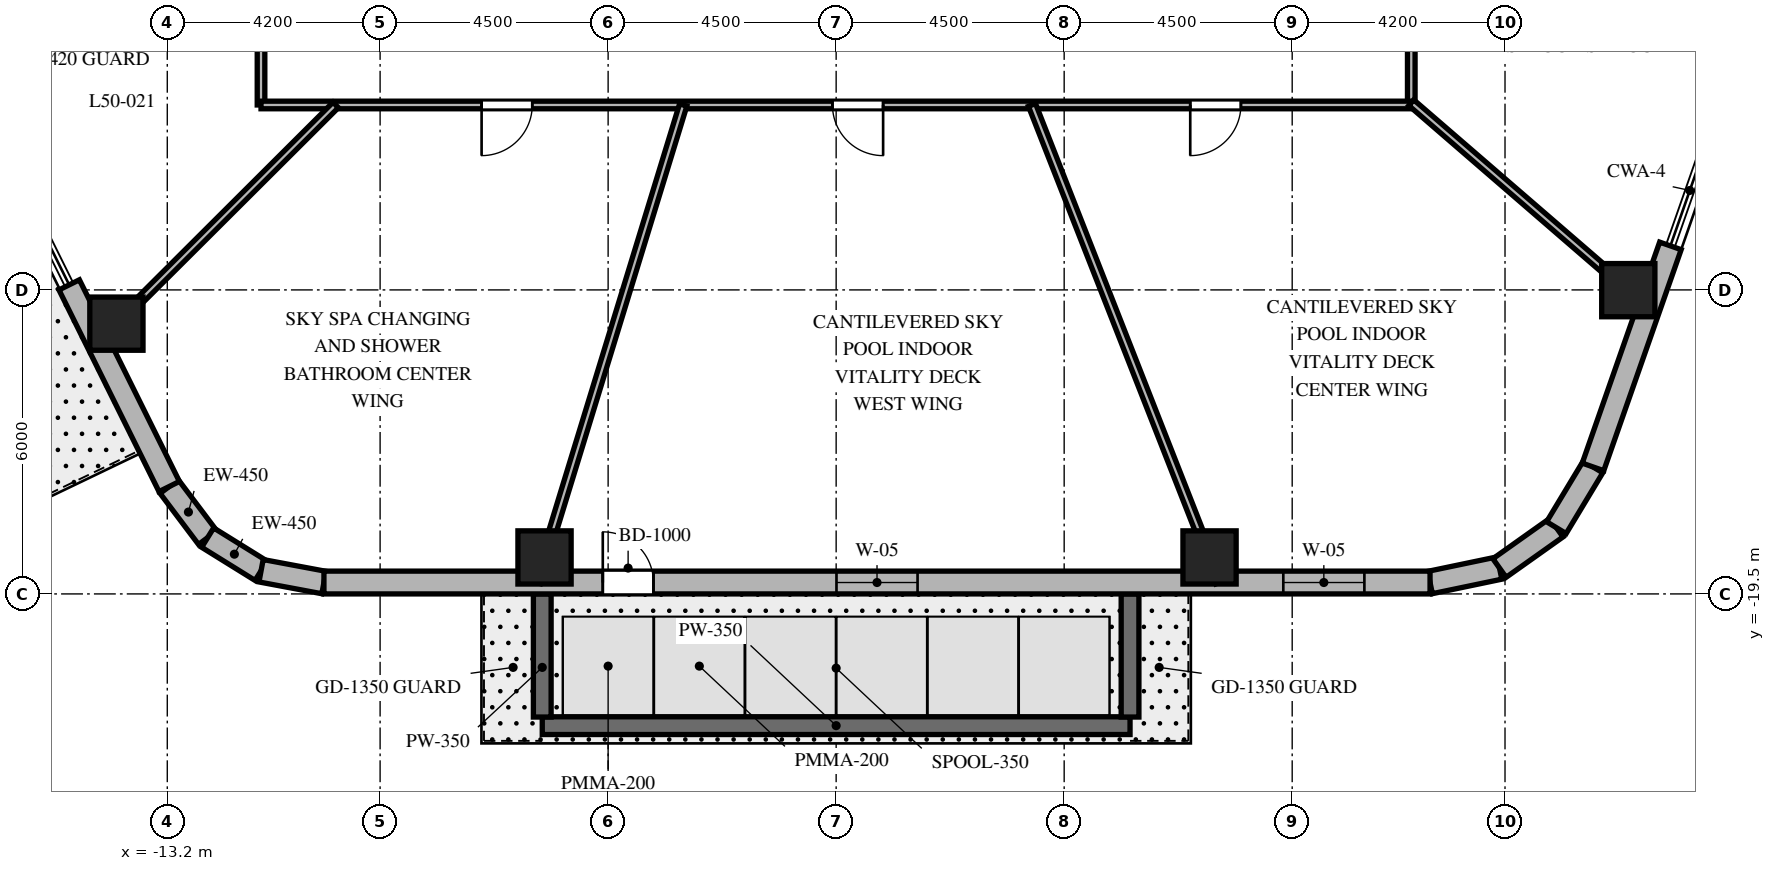
"""IFC4 building model, lengths in metres.
Left out: names, types, materials, properties, quantities, classifications, styles, units other than length and angle.
Written with IfcOpenShell. Run it as: python <this file> out.ifc"""

import sys

from ifc_helpers import new_model, si_unit, direction, frame, frame_2d, origin, origin_2d, place, context, subcontext, project, spatial, rectangle, extrude, element, fill, save


model = new_model("IFC4")
c1 = context("Model", 3, precision=1e-05, world=origin(), true_north=direction((0.0, 1.0)))
c2 = subcontext(c1, "Body", "Model", "MODEL_VIEW")
j1 = project(units=[si_unit("LENGTHUNIT", "METRE"), si_unit("PLANEANGLEUNIT", "RADIAN")], contexts=[c1])
p1 = place(None, origin())
s1 = spatial("IfcSite", under=j1, at=p1, CompositionType="ELEMENT")
p2 = place(p1, origin())
s2 = spatial("IfcBuilding", under=s1, at=p2, CompositionType="ELEMENT")
p3 = place(p2, frame((0.0, 0.0, 201.5)))
s3 = spatial("IfcBuildingStorey", under=s2, at=p3, CompositionType="ELEMENT", Elevation=201.5)
for number, where, z_axis, x_axis in (
    (1, (-5.755, -18.78, 0.0), (0.0, 0.0, 1.0), (1.0, 0.0, 0.0)),
    (2, (7.369, -18.78, 0.0), (0.0, 0.0, 1.0), (1.0, 0.0, 0.0)),
    (3, (15.633, -13.505, 0.0), (0.0, 0.0, 1.0), (1.0, 0.0, 0.0)),
    (4, (-14.204, -14.166, 0.0), (0.0, 0.0, 1.0), (1.0, 0.0, 0.0)),
):
    element("IfcColumn", number, at=place(p3, frame(where, z_axis=z_axis, x_axis=x_axis)), inside=s3, PredefinedType="COLUMN", context=c2, shape_type="SweptSolid", body=[
        extrude(rectangle(XDim=1.05, YDim=1.05, at=origin_2d()), origin(), (0.0, 0.0, 1.0), 5.0),
    ])
p4 = place(p3, frame((-5.8, -22.1, 0.0), z_axis=(0.0, 0.0, 1.0), x_axis=(1.0, 0.0, 0.0)))
e5 = element("IfcWall", 5, at=p4, inside=s3, PredefinedType="SOLIDWALL", context=c2, shape_type="SweptSolid", body=[
    extrude(rectangle(XDim=11.6, YDim=0.35, at=frame_2d((5.8, 0.0))), origin(), (0.0, 0.0, 1.0), 1.42),
])
for number, where, z_axis, x_axis in (
    (6, (-5.8, -21.93, 0.0), (0.0, 0.0, 1.0), (0.0, 1.0, 0.0)),
    (7, (5.8, -21.93, 0.0), (0.0, 0.0, 1.0), (0.0, 1.0, 0.0)),
):
    element("IfcWall", number, at=place(p3, frame(where, z_axis=z_axis, x_axis=x_axis)), inside=s3, PredefinedType="SOLIDWALL", context=c2, shape_type="SweptSolid", body=[
        extrude(rectangle(XDim=2.43, YDim=0.35, at=frame_2d((1.215, 0.0))), origin(), (0.0, 0.0, 1.0), 1.42),
    ])
p5 = place(p3, frame((-13.162, -17.381, 0.0), z_axis=(0.0, 0.0, 1.0), x_axis=(0.601515770517, -0.798860925205, 0.0)))
e8 = element("IfcWall", 8, at=p5, inside=s3, PredefinedType="SOLIDWALL", context=c2, shape_type="SweptSolid", body=[
    extrude(rectangle(XDim=1.262, YDim=0.45, at=frame_2d((0.631, 0.0))), origin(), (0.0, 0.0, 1.0), 4.7),
])
p6 = place(p3, frame((-12.403, -18.389, 0.0), z_axis=(0.0, 0.0, 1.0), x_axis=(0.849795170926, -0.527113049991, 0.0)))
e9 = element("IfcWall", 9, at=p6, inside=s3, PredefinedType="SOLIDWALL", context=c2, shape_type="SweptSolid", body=[
    extrude(rectangle(XDim=1.241, YDim=0.45, at=frame_2d((0.62, 0.0))), origin(), (0.0, 0.0, 1.0), 4.7),
])
p7 = place(p3, frame((-11.349, -19.043, 0.0), z_axis=(0.0, 0.0, 1.0), x_axis=(0.982931267051, -0.183973161772, 0.0)))
e10 = element("IfcWall", 10, at=p7, inside=s3, PredefinedType="SOLIDWALL", context=c2, shape_type="SweptSolid", body=[
    extrude(rectangle(XDim=1.262, YDim=0.45, at=frame_2d((0.631, 0.0))), origin(), (0.0, 0.0, 1.0), 4.7),
])
p8 = place(p3, frame((11.72, -19.275, 0.0), z_axis=(0.0, 0.0, 1.0), x_axis=(0.97893106758, 0.204191001093, 0.0)))
e11 = element("IfcWall", 11, at=p8, inside=s3, PredefinedType="SOLIDWALL", context=c2, shape_type="SweptSolid", body=[
    extrude(rectangle(XDim=1.4, YDim=0.45, at=frame_2d((0.7, 0.0))), origin(), (0.0, 0.0, 1.0), 4.7),
])
p9 = place(p3, frame((13.091, -18.989, 0.0), z_axis=(0.0, 0.0, 1.0), x_axis=(0.815574637848, 0.578651890258, 0.0)))
e12 = element("IfcWall", 12, at=p9, inside=s3, PredefinedType="SOLIDWALL", context=c2, shape_type="SweptSolid", body=[
    extrude(rectangle(XDim=1.377, YDim=0.45, at=frame_2d((0.688, 0.0))), origin(), (0.0, 0.0, 1.0), 4.7),
])
p10 = place(p3, frame((14.214, -18.192, 0.0), z_axis=(0.0, 0.0, 1.0), x_axis=(0.516340945502, 0.856383108193, 0.0)))
e13 = element("IfcWall", 13, at=p10, inside=s3, PredefinedType="SOLIDWALL", context=c2, shape_type="SweptSolid", body=[
    extrude(rectangle(XDim=1.4, YDim=0.45, at=frame_2d((0.7, 0.0))), origin(), (0.0, 0.0, 1.0), 4.7),
])
p11 = place(p3, frame((-10.108, -19.275, 0.0), z_axis=(0.0, 0.0, 1.0), x_axis=(1.0, 0.0, 0.0)))
e14 = element("IfcWall", 14, at=p11, inside=s3, PredefinedType="SOLIDWALL", context=c2, shape_type="SweptSolid", body=[
    extrude(rectangle(XDim=21.829, YDim=0.45, at=frame_2d((10.915, 0.0))), origin(), (0.0, 0.0, 1.0), 4.7),
])
p12 = place(p11, frame((5.503, 0.0, 0.0)))
e15 = element("IfcOpeningElement", 15, at=p12, cuts=e14, PredefinedType="OPENING", context=c2, shape_type="SweptSolid", body=[
    extrude(rectangle(XDim=1.0, YDim=2.15, at=frame_2d((0.5, 1.075))), frame((0.0, 0.235, 0.0), z_axis=(0.0, -1.0, 0.0), x_axis=(1.0, 0.0, 0.0)), (0.0, 0.0, 1.0), 0.47),
])
p13 = place(p11, frame((10.115, 0.0, 0.8)))
e16 = element("IfcOpeningElement", 16, at=p13, cuts=e14, PredefinedType="OPENING", context=c2, shape_type="SweptSolid", body=[
    extrude(rectangle(XDim=1.6, YDim=1.75, at=frame_2d((0.8, 0.875))), frame((0.0, 0.235, 0.0), z_axis=(0.0, -1.0, 0.0), x_axis=(1.0, 0.0, 0.0)), (0.0, 0.0, 1.0), 0.47),
])
p14 = place(p11, frame((18.933, 0.0, 0.8)))
e17 = element("IfcOpeningElement", 17, at=p14, cuts=e14, PredefinedType="OPENING", context=c2, shape_type="SweptSolid", body=[
    extrude(rectangle(XDim=1.6, YDim=1.75, at=frame_2d((0.8, 0.875))), frame((0.0, 0.235, 0.0), z_axis=(0.0, -1.0, 0.0), x_axis=(1.0, 0.0, 0.0)), (0.0, 0.0, 1.0), 0.47),
])
p15 = place(p3, frame((14.937, -16.993, 0.0), z_axis=(0.0, 0.0, 1.0), x_axis=(0.330437475159, 0.943827884209, 0.0)))
e18 = element("IfcWall", 18, at=p15, inside=s3, PredefinedType="SOLIDWALL", context=c2, shape_type="SweptSolid", body=[
    extrude(rectangle(XDim=4.622, YDim=0.45, at=frame_2d((2.311, 0.0))), origin(), (0.0, 0.0, 1.0), 4.7),
])
p16 = place(p3, frame((-15.136, -13.4, 0.0), z_axis=(0.0, 0.0, 1.0), x_axis=(0.444243648127, -0.895906011308, 0.0)))
e19 = element("IfcWall", 19, at=p16, inside=s3, PredefinedType="SOLIDWALL", context=c2, shape_type="SweptSolid", body=[
    extrude(rectangle(XDim=4.443, YDim=0.45, at=frame_2d((2.221, 0.0))), origin(), (0.0, 0.0, 1.0), 4.7),
])
p17 = place(p3, frame((-11.35, -9.85, 0.0), z_axis=(0.0, 0.0, 1.0), x_axis=(0.0, 1.0, 0.0)))
e20 = element("IfcWall", 20, at=p17, inside=s3, PredefinedType="PARTITIONING", context=c2, shape_type="SweptSolid", body=[
    extrude(rectangle(XDim=19.7, YDim=0.15, at=frame_2d((9.85, 0.0))), origin(), (0.0, 0.0, 1.0), 2.89),
])
p18 = place(p17, frame((15.183, 0.0, 0.0)))
e21 = element("IfcOpeningElement", 21, at=p18, cuts=e20, PredefinedType="OPENING", context=c2, shape_type="SweptSolid", body=[
    extrude(rectangle(XDim=1.0, YDim=2.03, at=frame_2d((0.5, 1.015))), frame((0.0, 0.085, 0.0), z_axis=(0.0, -1.0, 0.0), x_axis=(1.0, 0.0, 0.0)), (0.0, 0.0, 1.0), 0.17),
])
p19 = place(p17, frame((8.819, 0.0, 0.0)))
e22 = element("IfcOpeningElement", 22, at=p19, cuts=e20, PredefinedType="OPENING", context=c2, shape_type="SweptSolid", body=[
    extrude(rectangle(XDim=1.0, YDim=2.03, at=frame_2d((0.5, 1.015))), frame((0.0, 0.085, 0.0), z_axis=(0.0, -1.0, 0.0), x_axis=(1.0, 0.0, 0.0)), (0.0, 0.0, 1.0), 0.17),
])
p20 = place(p17, frame((2.989, 0.0, 0.0)))
e23 = element("IfcOpeningElement", 23, at=p20, cuts=e20, PredefinedType="OPENING", context=c2, shape_type="SweptSolid", body=[
    extrude(rectangle(XDim=1.0, YDim=2.03, at=frame_2d((0.5, 1.015))), frame((0.0, 0.085, 0.0), z_axis=(0.0, -1.0, 0.0), x_axis=(1.0, 0.0, 0.0)), (0.0, 0.0, 1.0), 0.17),
])
p21 = place(p3, frame((11.35, 9.85, 0.0), z_axis=(0.0, 0.0, 1.0), x_axis=(0.0, -1.0, 0.0)))
e24 = element("IfcWall", 24, at=p21, inside=s3, PredefinedType="PARTITIONING", context=c2, shape_type="SweptSolid", body=[
    extrude(rectangle(XDim=19.7, YDim=0.15, at=frame_2d((9.85, 0.0))), origin(), (0.0, 0.0, 1.0), 2.89),
])
p22 = place(p21, frame((2.989, 0.0, 0.0)))
e25 = element("IfcOpeningElement", 25, at=p22, cuts=e24, PredefinedType="OPENING", context=c2, shape_type="SweptSolid", body=[
    extrude(rectangle(XDim=1.0, YDim=2.03, at=frame_2d((0.5, 1.015))), frame((0.0, 0.085, 0.0), z_axis=(0.0, -1.0, 0.0), x_axis=(1.0, 0.0, 0.0)), (0.0, 0.0, 1.0), 0.17),
])
p23 = place(p21, frame((15.183, 0.0, 0.0)))
e26 = element("IfcOpeningElement", 26, at=p23, cuts=e24, PredefinedType="OPENING", context=c2, shape_type="SweptSolid", body=[
    extrude(rectangle(XDim=1.0, YDim=2.03, at=frame_2d((0.5, 1.015))), frame((0.0, 0.085, 0.0), z_axis=(0.0, -1.0, 0.0), x_axis=(1.0, 0.0, 0.0)), (0.0, 0.0, 1.0), 0.17),
])
p24 = place(p21, frame((8.819, 0.0, 0.0)))
e27 = element("IfcOpeningElement", 27, at=p24, cuts=e24, PredefinedType="OPENING", context=c2, shape_type="SweptSolid", body=[
    extrude(rectangle(XDim=1.0, YDim=2.03, at=frame_2d((0.5, 1.015))), frame((0.0, 0.085, 0.0), z_axis=(0.0, -1.0, 0.0), x_axis=(1.0, 0.0, 0.0)), (0.0, 0.0, 1.0), 0.17),
])
p25 = place(p3, frame((11.35, -9.85, 0.0), z_axis=(0.0, 0.0, 1.0), x_axis=(-1.0, 0.0, 0.0)))
e28 = element("IfcWall", 28, at=p25, inside=s3, PredefinedType="PARTITIONING", context=c2, shape_type="SweptSolid", body=[
    extrude(rectangle(XDim=22.7, YDim=0.15, at=frame_2d((11.35, 0.0))), origin(), (0.0, 0.0, 1.0), 2.89),
])
p26 = place(p25, frame((17.347, 0.0, 0.0)))
e29 = element("IfcOpeningElement", 29, at=p26, cuts=e28, PredefinedType="OPENING", context=c2, shape_type="SweptSolid", body=[
    extrude(rectangle(XDim=1.0, YDim=2.03, at=frame_2d((0.5, 1.015))), frame((0.0, 0.085, 0.0), z_axis=(0.0, -1.0, 0.0), x_axis=(1.0, 0.0, 0.0)), (0.0, 0.0, 1.0), 0.17),
])
p27 = place(p25, frame((10.423, 0.0, 0.0)))
e30 = element("IfcOpeningElement", 30, at=p27, cuts=e28, PredefinedType="OPENING", context=c2, shape_type="SweptSolid", body=[
    extrude(rectangle(XDim=1.0, YDim=2.03, at=frame_2d((0.5, 1.015))), frame((0.0, 0.085, 0.0), z_axis=(0.0, -1.0, 0.0), x_axis=(1.0, 0.0, 0.0)), (0.0, 0.0, 1.0), 0.17),
])
p28 = place(p25, frame((3.362, 0.0, 0.0)))
e31 = element("IfcOpeningElement", 31, at=p28, cuts=e28, PredefinedType="OPENING", context=c2, shape_type="SweptSolid", body=[
    extrude(rectangle(XDim=1.0, YDim=2.03, at=frame_2d((0.5, 1.015))), frame((0.0, 0.085, 0.0), z_axis=(0.0, -1.0, 0.0), x_axis=(1.0, 0.0, 0.0)), (0.0, 0.0, 1.0), 0.17),
])
p29 = place(p3, frame((-9.876, -9.85, 0.0), z_axis=(0.0, 0.0, 1.0), x_axis=(-0.708044623933, -0.706167692917, 0.0)))
e32 = element("IfcWall", 32, at=p29, inside=s3, PredefinedType="PARTITIONING", context=c2, shape_type="SweptSolid", body=[
    extrude(rectangle(XDim=6.634, YDim=0.15, at=frame_2d((3.317, 0.0))), origin(), (0.0, 0.0, 1.0), 2.89),
])
p30 = place(p3, frame((-3.019, -9.85, 0.0), z_axis=(0.0, 0.0, 1.0), x_axis=(-0.292996168014, -0.956113615387, 0.0)))
e33 = element("IfcWall", 33, at=p30, inside=s3, PredefinedType="PARTITIONING", context=c2, shape_type="SweptSolid", body=[
    extrude(rectangle(XDim=9.857, YDim=0.15, at=frame_2d((4.929, 0.0))), origin(), (0.0, 0.0, 1.0), 2.89),
])
p31 = place(p3, frame((3.865, -9.85, 0.0), z_axis=(0.0, 0.0, 1.0), x_axis=(0.365279308356, -0.930897968033, 0.0)))
e34 = element("IfcWall", 34, at=p31, inside=s3, PredefinedType="PARTITIONING", context=c2, shape_type="SweptSolid", body=[
    extrude(rectangle(XDim=10.125, YDim=0.15, at=frame_2d((5.062, 0.0))), origin(), (0.0, 0.0, 1.0), 2.89),
])
p32 = place(p3, frame((11.35, -9.805, 0.0), z_axis=(0.0, 0.0, 1.0), x_axis=(0.75671839422, -0.653740982232, 0.0)))
e35 = element("IfcWall", 35, at=p32, inside=s3, PredefinedType="PARTITIONING", context=c2, shape_type="SweptSolid", body=[
    extrude(rectangle(XDim=6.193, YDim=0.15, at=frame_2d((3.096, 0.0))), origin(), (0.0, 0.0, 1.0), 2.89),
])
p33 = place(p12, origin())
e36 = element("IfcDoor", 36, at=p33, inside=s3, OperationType="SINGLE_SWING_LEFT", PredefinedType="DOOR", context=c2, shape_type="SweptSolid", body=[
    extrude(rectangle(XDim=1.0, YDim=2.15, at=frame_2d((0.5, 1.075))), frame((0.0, 0.025, 0.0), z_axis=(0.0, -1.0, 0.0), x_axis=(1.0, 0.0, 0.0)), (0.0, 0.0, 1.0), 0.05),
])
fill(e15, e36)
p34 = place(p13, origin())
e37 = element("IfcWindow", 37, at=p34, inside=s3, PartitioningType="SINGLE_PANEL", PredefinedType="WINDOW", context=c2, shape_type="SweptSolid", body=[
    extrude(rectangle(XDim=1.6, YDim=1.75, at=frame_2d((0.8, 0.875))), frame((0.0, 0.03, 0.0), z_axis=(0.0, -1.0, 0.0), x_axis=(1.0, 0.0, 0.0)), (0.0, 0.0, 1.0), 0.06),
])
fill(e16, e37)
p35 = place(p14, origin())
e38 = element("IfcWindow", 38, at=p35, inside=s3, PartitioningType="SINGLE_PANEL", PredefinedType="WINDOW", context=c2, shape_type="SweptSolid", body=[
    extrude(rectangle(XDim=1.6, YDim=1.75, at=frame_2d((0.8, 0.875))), frame((0.0, 0.03, 0.0), z_axis=(0.0, -1.0, 0.0), x_axis=(1.0, 0.0, 0.0)), (0.0, 0.0, 1.0), 0.06),
])
fill(e17, e38)
p36 = place(p26, origin())
e39 = element("IfcDoor", 39, at=p36, inside=s3, OperationType="SINGLE_SWING_RIGHT", PredefinedType="DOOR", context=c2, shape_type="SweptSolid", body=[
    extrude(rectangle(XDim=1.0, YDim=2.03, at=frame_2d((0.5, 1.015))), frame((0.0, 0.025, 0.0), z_axis=(0.0, -1.0, 0.0), x_axis=(1.0, 0.0, 0.0)), (0.0, 0.0, 1.0), 0.05),
])
fill(e29, e39)
p37 = place(p27, origin())
e40 = element("IfcDoor", 40, at=p37, inside=s3, OperationType="SINGLE_SWING_LEFT", PredefinedType="DOOR", context=c2, shape_type="SweptSolid", body=[
    extrude(rectangle(XDim=1.0, YDim=2.03, at=frame_2d((0.5, 1.015))), frame((0.0, 0.025, 0.0), z_axis=(0.0, -1.0, 0.0), x_axis=(1.0, 0.0, 0.0)), (0.0, 0.0, 1.0), 0.05),
])
fill(e30, e40)
p38 = place(p28, origin())
e41 = element("IfcDoor", 41, at=p38, inside=s3, OperationType="SINGLE_SWING_RIGHT", PredefinedType="DOOR", context=c2, shape_type="SweptSolid", body=[
    extrude(rectangle(XDim=1.0, YDim=2.03, at=frame_2d((0.5, 1.015))), frame((0.0, 0.025, 0.0), z_axis=(0.0, -1.0, 0.0), x_axis=(1.0, 0.0, 0.0)), (0.0, 0.0, 1.0), 0.05),
])
fill(e31, e41)
save(model, sys.argv[1])
